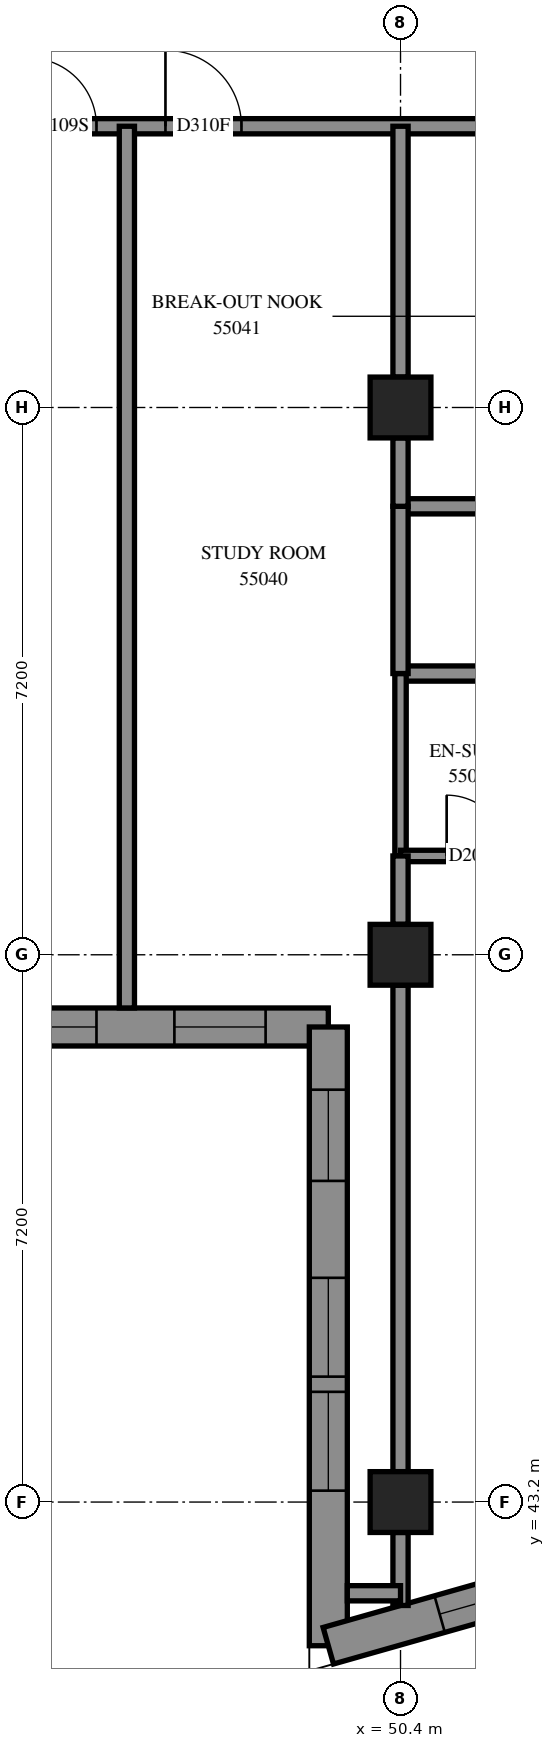
"""IFC4 building model, lengths in metres.
Left out: names, types, materials, properties, quantities, classifications, styles, units other than length and angle.
Written with IfcOpenShell. Run it as: python <this file> out.ifc"""

import sys

from ifc_helpers import new_model, si_unit, direction, frame, frame_2d, origin, origin_2d, place, context, subcontext, project, spatial, polyline, rectangle, outline, extrude, element, fill, save


model = new_model("IFC4")
c1 = context("Model", 3, precision=1e-05, world=origin(), true_north=direction((0.0, 1.0)))
c2 = subcontext(c1, "Body", "Model", "MODEL_VIEW")
j1 = project(units=[si_unit("LENGTHUNIT", "METRE"), si_unit("PLANEANGLEUNIT", "RADIAN")], contexts=[c1])
p1 = place(None, origin())
s1 = spatial("IfcSite", under=j1, at=p1, CompositionType="ELEMENT")
p2 = place(p1, origin())
s2 = spatial("IfcBuilding", under=s1, at=p2, CompositionType="ELEMENT")
p3 = place(p2, frame((0.0, 0.0, 203.2)))
s3 = spatial("IfcBuildingStorey", under=s2, at=p3, CompositionType="ELEMENT", Elevation=203.2)
for number, where, z_axis, x_axis in (
    (1, (50.4, 43.2, 0.0), (0.0, 0.0, 1.0), (1.0, 0.0, 0.0)),
    (2, (50.4, 50.4, 0.0), (0.0, 0.0, 1.0), (1.0, 0.0, 0.0)),
    (3, (50.4, 57.6, 0.0), (0.0, 0.0, 1.0), (1.0, 0.0, 0.0)),
):
    element("IfcColumn", number, at=place(p3, frame(where, z_axis=z_axis, x_axis=x_axis)), inside=s3, PredefinedType="COLUMN", context=c2, shape_type="SweptSolid", body=[
        extrude(rectangle(XDim=0.8, YDim=0.8, at=origin_2d()), origin(), (0.0, 0.0, 1.0), 3.1),
    ])
p4 = place(p3, frame((42.25, 49.45, 0.0), z_axis=(0.0, 0.0, 1.0), x_axis=(1.0, 0.0, 0.0)))
e4 = element("IfcWall", 4, at=p4, inside=s3, PredefinedType="SOLIDWALL", context=c2, shape_type="SweptSolid", body=[
    extrude(outline(polyline([(-0.25, -0.25), (6.95, -0.25), (7.45, 0.25), (0.25, 0.25), (-0.25, -0.25)])), origin(), (0.0, 0.0, 1.0), 3.1),
])
p5 = place(p4, frame((1.35, 0.0, 0.45)))
e5 = element("IfcOpeningElement", 5, at=p5, cuts=e4, PredefinedType="OPENING", context=c2, shape_type="SweptSolid", body=[
    extrude(rectangle(XDim=1.3, YDim=2.5, at=frame_2d((0.65, 1.25))), frame((0.0, 0.26, 0.0), z_axis=(0.0, -1.0, 0.0), x_axis=(1.0, 0.0, 0.0)), (0.0, 0.0, 1.0), 0.52),
])
p6 = place(p4, frame((2.85, 0.0, 0.45)))
e6 = element("IfcOpeningElement", 6, at=p6, cuts=e4, PredefinedType="OPENING", context=c2, shape_type="SweptSolid", body=[
    extrude(rectangle(XDim=1.3, YDim=2.5, at=frame_2d((0.65, 1.25))), frame((0.0, 0.26, 0.0), z_axis=(0.0, -1.0, 0.0), x_axis=(1.0, 0.0, 0.0)), (0.0, 0.0, 1.0), 0.52),
])
p7 = place(p4, frame((5.175, 0.0, 0.45)))
e7 = element("IfcOpeningElement", 7, at=p7, cuts=e4, PredefinedType="OPENING", context=c2, shape_type="SweptSolid", body=[
    extrude(rectangle(XDim=1.2, YDim=2.5, at=frame_2d((0.6, 1.25))), frame((0.0, 0.26, 0.0), z_axis=(0.0, -1.0, 0.0), x_axis=(1.0, 0.0, 0.0)), (0.0, 0.0, 1.0), 0.52),
])
p8 = place(p3, frame((49.45, 49.45, 0.0), z_axis=(0.0, 0.0, 1.0), x_axis=(0.0, -1.0, 0.0)))
e8 = element("IfcWall", 8, at=p8, inside=s3, PredefinedType="SOLIDWALL", context=c2, shape_type="SweptSolid", body=[
    extrude(outline(polyline([(0.25, -0.25), (8.471, -0.25), (7.809, 0.25), (-0.25, 0.25), (0.25, -0.25)])), origin(), (0.0, 0.0, 1.0), 3.1),
])
p9 = place(p8, frame((3.3, 0.0, 0.45)))
e9 = element("IfcOpeningElement", 9, at=p9, cuts=e8, PredefinedType="OPENING", context=c2, shape_type="SweptSolid", body=[
    extrude(rectangle(XDim=1.3, YDim=2.5, at=frame_2d((0.65, 1.25))), frame((0.0, 0.26, 0.0), z_axis=(0.0, -1.0, 0.0), x_axis=(1.0, 0.0, 0.0)), (0.0, 0.0, 1.0), 0.52),
])
p10 = place(p8, frame((4.8, 0.0, 0.45)))
e10 = element("IfcOpeningElement", 10, at=p10, cuts=e8, PredefinedType="OPENING", context=c2, shape_type="SweptSolid", body=[
    extrude(rectangle(XDim=1.3, YDim=2.5, at=frame_2d((0.65, 1.25))), frame((0.0, 0.26, 0.0), z_axis=(0.0, -1.0, 0.0), x_axis=(1.0, 0.0, 0.0)), (0.0, 0.0, 1.0), 0.52),
])
p11 = place(p8, frame((0.825, 0.0, 0.45)))
e11 = element("IfcOpeningElement", 11, at=p11, cuts=e8, PredefinedType="OPENING", context=c2, shape_type="SweptSolid", body=[
    extrude(rectangle(XDim=1.2, YDim=2.5, at=frame_2d((0.6, 1.25))), frame((0.0, 0.26, 0.0), z_axis=(0.0, -1.0, 0.0), x_axis=(1.0, 0.0, 0.0)), (0.0, 0.0, 1.0), 0.52),
])
p12 = place(p3, frame((49.45, 41.31, 0.0), z_axis=(0.0, 0.0, 1.0), x_axis=(0.9619950248, 0.2730669739, 0.0)))
e12 = element("IfcWall", 12, at=p12, inside=s3, PredefinedType="SOLIDWALL", context=c2, shape_type="SweptSolid", body=[
    extrude(outline(polyline([(-0.331, -0.25), (3.408, -0.25), (3.508, 0.25), (0.331, 0.25), (-0.331, -0.25)])), origin(), (0.0, 0.0, 1.0), 3.1),
])
p13 = place(p12, frame((1.523, 0.0, 0.45)))
e13 = element("IfcOpeningElement", 13, at=p13, cuts=e12, PredefinedType="OPENING", context=c2, shape_type="SweptSolid", body=[
    extrude(rectangle(XDim=1.2, YDim=2.5, at=frame_2d((0.6, 1.25))), frame((0.0, 0.26, 0.0), z_axis=(0.0, -1.0, 0.0), x_axis=(1.0, 0.0, 0.0)), (0.0, 0.0, 1.0), 0.52),
])
p14 = place(p3, frame((36.0, 61.3, 0.0), z_axis=(0.0, 0.0, 1.0), x_axis=(1.0, 0.0, 0.0)))
e14 = element("IfcWall", 14, at=p14, inside=s3, PredefinedType="PARTITIONING", context=c2, shape_type="SweptSolid", body=[
    extrude(rectangle(XDim=16.9, YDim=0.2, at=frame_2d((8.45, 0.0))), origin(), (0.0, 0.0, 1.0), 3.1),
])
p15 = place(p14, frame((2.3, 0.0, 0.0)))
e15 = element("IfcOpeningElement", 15, at=p15, cuts=e14, PredefinedType="OPENING", context=c2, shape_type="SweptSolid", body=[
    extrude(rectangle(XDim=0.9, YDim=2.1, at=frame_2d((0.45, 1.05))), frame((0.0, 0.11, 0.0), z_axis=(0.0, -1.0, 0.0), x_axis=(1.0, 0.0, 0.0)), (0.0, 0.0, 1.0), 0.22),
])
p16 = place(p14, frame((4.107, 0.0, 0.0)))
e16 = element("IfcOpeningElement", 16, at=p16, cuts=e14, PredefinedType="OPENING", context=c2, shape_type="SweptSolid", body=[
    extrude(rectangle(XDim=1.0, YDim=2.1, at=frame_2d((0.5, 1.05))), frame((0.0, 0.11, 0.0), z_axis=(0.0, -1.0, 0.0), x_axis=(1.0, 0.0, 0.0)), (0.0, 0.0, 1.0), 0.22),
])
p17 = place(p14, frame((9.5, 0.0, 0.0)))
e17 = element("IfcOpeningElement", 17, at=p17, cuts=e14, PredefinedType="OPENING", context=c2, shape_type="SweptSolid", body=[
    extrude(rectangle(XDim=0.9, YDim=2.1, at=frame_2d((0.45, 1.05))), frame((0.0, 0.11, 0.0), z_axis=(0.0, -1.0, 0.0), x_axis=(1.0, 0.0, 0.0)), (0.0, 0.0, 1.0), 0.22),
])
p18 = place(p14, frame((11.307, 0.0, 0.0)))
e18 = element("IfcOpeningElement", 18, at=p18, cuts=e14, PredefinedType="OPENING", context=c2, shape_type="SweptSolid", body=[
    extrude(rectangle(XDim=1.0, YDim=2.1, at=frame_2d((0.5, 1.05))), frame((0.0, 0.11, 0.0), z_axis=(0.0, -1.0, 0.0), x_axis=(1.0, 0.0, 0.0)), (0.0, 0.0, 1.0), 0.22),
])
p19 = place(p14, frame((15.647, 0.0, 0.0)))
e19 = element("IfcOpeningElement", 19, at=p19, cuts=e14, PredefinedType="OPENING", context=c2, shape_type="SweptSolid", body=[
    extrude(rectangle(XDim=1.0, YDim=2.1, at=frame_2d((0.5, 1.05))), frame((0.0, 0.11, 0.0), z_axis=(0.0, -1.0, 0.0), x_axis=(1.0, 0.0, 0.0)), (0.0, 0.0, 1.0), 0.22),
])
p20 = place(p3, frame((46.8, 49.7, 0.0), z_axis=(0.0, 0.0, 1.0), x_axis=(0.0, 1.0, 0.0)))
e20 = element("IfcWall", 20, at=p20, inside=s3, PredefinedType="PARTITIONING", context=c2, shape_type="SweptSolid", body=[
    extrude(rectangle(XDim=11.6, YDim=0.2, at=frame_2d((5.8, 0.0))), origin(), (0.0, 0.0, 1.0), 3.1),
])
p21 = place(p3, frame((50.4, 43.6, 0.0), z_axis=(0.0, 0.0, 1.0), x_axis=(0.0, 1.0, 0.0)))
e21 = element("IfcWall", 21, at=p21, inside=s3, PredefinedType="PARTITIONING", context=c2, shape_type="SweptSolid", body=[
    extrude(rectangle(XDim=6.4, YDim=0.2, at=frame_2d((3.2, 0.0))), origin(), (0.0, 0.0, 1.0), 2.6),
])
p22 = place(p3, frame((50.4, 54.1, 0.0), z_axis=(0.0, 0.0, 1.0), x_axis=(1.0, 0.0, 0.0)))
e22 = element("IfcWall", 22, at=p22, inside=s3, PredefinedType="PARTITIONING", context=c2, shape_type="SweptSolid", body=[
    extrude(rectangle(XDim=4.6, YDim=0.2, at=frame_2d((2.3, 0.0))), origin(), (0.0, 0.0, 1.0), 3.1),
])
p23 = place(p22, frame((2.3, 0.0, 0.0)))
e23 = element("IfcOpeningElement", 23, at=p23, cuts=e22, PredefinedType="OPENING", context=c2, shape_type="SweptSolid", body=[
    extrude(rectangle(XDim=0.9, YDim=2.1, at=frame_2d((0.45, 1.05))), frame((0.0, 0.11, 0.0), z_axis=(0.0, -1.0, 0.0), x_axis=(1.0, 0.0, 0.0)), (0.0, 0.0, 1.0), 0.22),
])
p24 = place(p3, frame((50.4, 58.0, 0.0), z_axis=(0.0, 0.0, 1.0), x_axis=(0.0, 1.0, 0.0)))
e24 = element("IfcWall", 24, at=p24, inside=s3, PredefinedType="PARTITIONING", context=c2, shape_type="SweptSolid", body=[
    extrude(rectangle(XDim=3.3, YDim=0.2, at=frame_2d((1.65, 0.0))), origin(), (0.0, 0.0, 1.0), 3.1),
])
p25 = place(p3, frame((50.4, 56.3, 0.0), z_axis=(0.0, 0.0, 1.0), x_axis=(1.0, 0.0, 0.0)))
e25 = element("IfcWall", 25, at=p25, inside=s3, PredefinedType="PARTITIONING", context=c2, shape_type="SweptSolid", body=[
    extrude(rectangle(XDim=2.5, YDim=0.2, at=frame_2d((1.25, 0.0))), origin(), (0.0, 0.0, 1.0), 3.1),
])
p26 = place(p3, frame((50.4, 51.7, 0.0), z_axis=(0.0, 0.0, 1.0), x_axis=(0.0, 1.0, 0.0)))
e26 = element("IfcWall", 26, at=p26, inside=s3, PredefinedType="PARTITIONING", context=c2, shape_type="SweptSolid", body=[
    extrude(rectangle(XDim=2.4, YDim=0.15, at=frame_2d((1.2, 0.0))), origin(), (0.0, 0.0, 1.0), 3.1),
])
p27 = place(p3, frame((50.4, 54.1, 0.0), z_axis=(0.0, 0.0, 1.0), x_axis=(0.0, 1.0, 0.0)))
e27 = element("IfcWall", 27, at=p27, inside=s3, PredefinedType="PARTITIONING", context=c2, shape_type="SweptSolid", body=[
    extrude(rectangle(XDim=2.2, YDim=0.2, at=frame_2d((1.1, 0.0))), origin(), (0.0, 0.0, 1.0), 3.1),
])
p28 = place(p3, frame((50.4, 51.7, 0.0), z_axis=(0.0, 0.0, 1.0), x_axis=(1.0, 0.0, 0.0)))
e28 = element("IfcWall", 28, at=p28, inside=s3, PredefinedType="PARTITIONING", context=c2, shape_type="SweptSolid", body=[
    extrude(rectangle(XDim=1.9, YDim=0.15, at=frame_2d((0.95, 0.0))), origin(), (0.0, 0.0, 1.0), 3.1),
])
p29 = place(p28, frame((0.607, 0.0, 0.0)))
e29 = element("IfcOpeningElement", 29, at=p29, cuts=e28, PredefinedType="OPENING", context=c2, shape_type="SweptSolid", body=[
    extrude(rectangle(XDim=0.8, YDim=2.1, at=frame_2d((0.4, 1.05))), frame((0.0, 0.085, 0.0), z_axis=(0.0, -1.0, 0.0), x_axis=(1.0, 0.0, 0.0)), (0.0, 0.0, 1.0), 0.17),
])
for number, where, z_axis, x_axis in (
    (30, (50.4, 50.8, 0.0), (0.0, 0.0, 1.0), (0.0, 1.0, 0.0)),
    (31, (50.4, 56.3, 0.0), (0.0, 0.0, 1.0), (0.0, 1.0, 0.0)),
):
    element("IfcWall", number, at=place(p3, frame(where, z_axis=z_axis, x_axis=x_axis)), inside=s3, PredefinedType="PARTITIONING", context=c2, shape_type="SweptSolid", body=[
        extrude(rectangle(XDim=0.9, YDim=0.2, at=frame_2d((0.45, 0.0))), origin(), (0.0, 0.0, 1.0), 3.1),
    ])
p30 = place(p3, frame((50.4, 41.839, 0.0), z_axis=(0.0, 0.0, 1.0), x_axis=(0.0, 1.0, 0.0)))
e32 = element("IfcWall", 32, at=p30, inside=s3, PredefinedType="PARTITIONING", context=c2, shape_type="SweptSolid", body=[
    extrude(rectangle(XDim=0.961, YDim=0.2, at=frame_2d((0.48, 0.0))), origin(), (0.0, 0.0, 1.0), 3.1),
])
p31 = place(p3, frame((49.7, 42.0, 0.0), z_axis=(0.0, 0.0, 1.0), x_axis=(1.0, 0.0, 0.0)))
e33 = element("IfcWall", 33, at=p31, inside=s3, PredefinedType="PARTITIONING", context=c2, shape_type="SweptSolid", body=[
    extrude(rectangle(XDim=0.7, YDim=0.2, at=frame_2d((0.35, 0.0))), origin(), (0.0, 0.0, 1.0), 3.1),
])
p32 = place(p6, origin())
e34 = element("IfcWindow", 34, at=p32, inside=s3, PartitioningType="SINGLE_PANEL", PredefinedType="WINDOW", context=c2, shape_type="SweptSolid", body=[
    extrude(rectangle(XDim=1.3, YDim=2.5, at=frame_2d((0.65, 1.25))), frame((0.0, 0.18, 0.0), z_axis=(0.0, -1.0, 0.0), x_axis=(1.0, 0.0, 0.0)), (0.0, 0.0, 1.0), 0.06),
])
fill(e6, e34)
p33 = place(p7, origin())
e35 = element("IfcWindow", 35, at=p33, inside=s3, PartitioningType="SINGLE_PANEL", PredefinedType="WINDOW", context=c2, shape_type="SweptSolid", body=[
    extrude(rectangle(XDim=1.2, YDim=2.5, at=frame_2d((0.6, 1.25))), frame((0.0, 0.18, 0.0), z_axis=(0.0, -1.0, 0.0), x_axis=(1.0, 0.0, 0.0)), (0.0, 0.0, 1.0), 0.06),
])
fill(e7, e35)
p34 = place(p9, origin())
e36 = element("IfcWindow", 36, at=p34, inside=s3, PartitioningType="SINGLE_PANEL", PredefinedType="WINDOW", context=c2, shape_type="SweptSolid", body=[
    extrude(rectangle(XDim=1.3, YDim=2.5, at=frame_2d((0.65, 1.25))), frame((0.0, 0.18, 0.0), z_axis=(0.0, -1.0, 0.0), x_axis=(1.0, 0.0, 0.0)), (0.0, 0.0, 1.0), 0.06),
])
fill(e9, e36)
p35 = place(p10, origin())
e37 = element("IfcWindow", 37, at=p35, inside=s3, PartitioningType="SINGLE_PANEL", PredefinedType="WINDOW", context=c2, shape_type="SweptSolid", body=[
    extrude(rectangle(XDim=1.3, YDim=2.5, at=frame_2d((0.65, 1.25))), frame((0.0, 0.18, 0.0), z_axis=(0.0, -1.0, 0.0), x_axis=(1.0, 0.0, 0.0)), (0.0, 0.0, 1.0), 0.06),
])
fill(e10, e37)
p36 = place(p11, origin())
e38 = element("IfcWindow", 38, at=p36, inside=s3, PartitioningType="SINGLE_PANEL", PredefinedType="WINDOW", context=c2, shape_type="SweptSolid", body=[
    extrude(rectangle(XDim=1.2, YDim=2.5, at=frame_2d((0.6, 1.25))), frame((0.0, 0.18, 0.0), z_axis=(0.0, -1.0, 0.0), x_axis=(1.0, 0.0, 0.0)), (0.0, 0.0, 1.0), 0.06),
])
fill(e11, e38)
p37 = place(p13, origin())
e39 = element("IfcWindow", 39, at=p37, inside=s3, PartitioningType="SINGLE_PANEL", PredefinedType="WINDOW", context=c2, shape_type="SweptSolid", body=[
    extrude(rectangle(XDim=1.2, YDim=2.5, at=frame_2d((0.6, 1.25))), frame((0.0, 0.18, 0.0), z_axis=(0.0, -1.0, 0.0), x_axis=(1.0, 0.0, 0.0)), (0.0, 0.0, 1.0), 0.06),
])
fill(e13, e39)
p38 = place(p17, origin())
e40 = element("IfcDoor", 40, at=p38, inside=s3, OperationType="SINGLE_SWING_LEFT", PredefinedType="DOOR", context=c2, shape_type="SweptSolid", body=[
    extrude(rectangle(XDim=0.9, YDim=2.1, at=frame_2d((0.45, 1.05))), frame((0.0, 0.025, 0.0), z_axis=(0.0, -1.0, 0.0), x_axis=(1.0, 0.0, 0.0)), (0.0, 0.0, 1.0), 0.05),
])
fill(e17, e40)
p39 = place(p18, origin())
e41 = element("IfcDoor", 41, at=p39, inside=s3, OperationType="SINGLE_SWING_RIGHT", PredefinedType="DOOR", context=c2, shape_type="SweptSolid", body=[
    extrude(rectangle(XDim=1.0, YDim=2.1, at=frame_2d((0.5, 1.05))), frame((0.0, 0.025, 0.0), z_axis=(0.0, -1.0, 0.0), x_axis=(1.0, 0.0, 0.0)), (0.0, 0.0, 1.0), 0.05),
])
fill(e18, e41)
p40 = place(p29, origin())
e42 = element("IfcDoor", 42, at=p40, inside=s3, OperationType="SINGLE_SWING_RIGHT", PredefinedType="DOOR", context=c2, shape_type="SweptSolid", body=[
    extrude(rectangle(XDim=0.8, YDim=2.1, at=frame_2d((0.4, 1.05))), frame((0.0, 0.025, 0.0), z_axis=(0.0, -1.0, 0.0), x_axis=(1.0, 0.0, 0.0)), (0.0, 0.0, 1.0), 0.05),
])
fill(e29, e42)
save(model, sys.argv[1])
